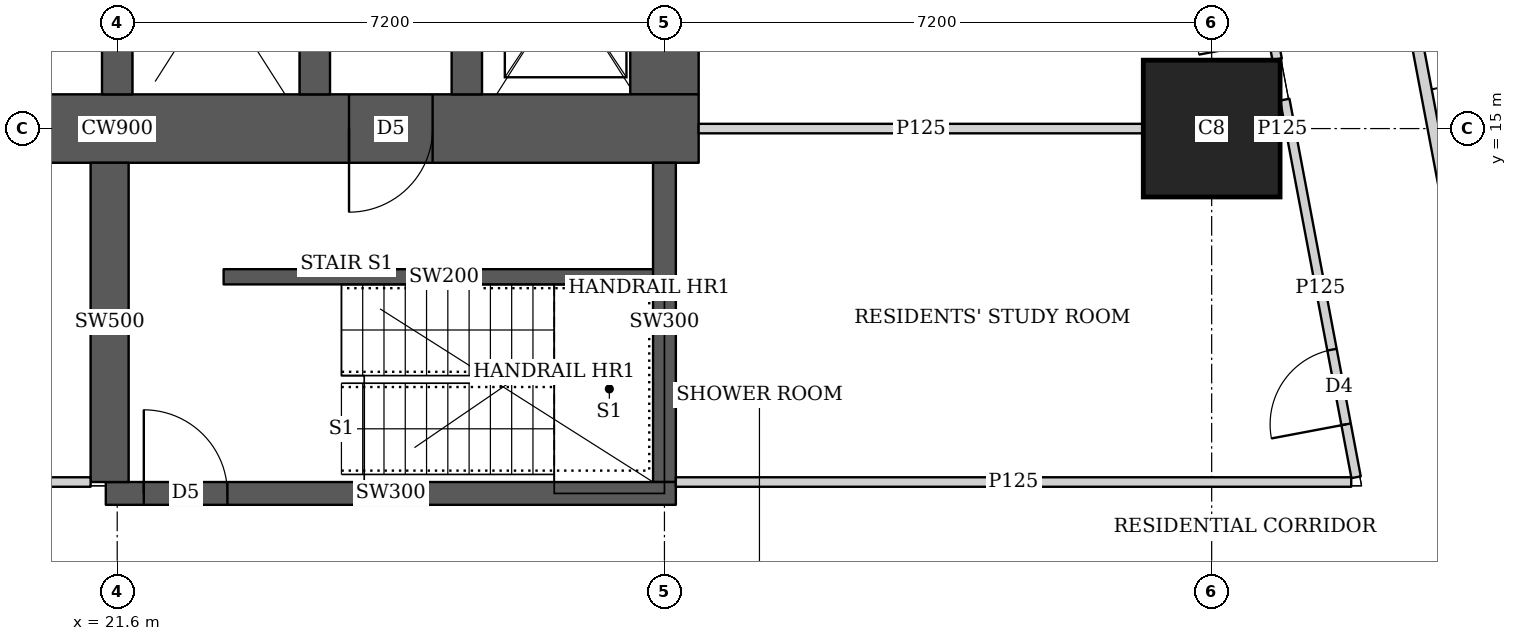
"""IFC4 building model, lengths in metres.
Left out: names, types, materials, properties, quantities, classifications, styles, units other than length and angle.
Written with IfcOpenShell. Run it as: python <this file> out.ifc"""

import sys

from ifc_helpers import new_model, si_unit, direction, frame, frame_2d, origin, origin_2d, place, context, subcontext, project, spatial, rectangle, extrude, element, fill, save


model = new_model("IFC4")
c1 = context("Model", 3, precision=1e-05, world=origin(), true_north=direction((0.0, 1.0)))
c2 = subcontext(c1, "Body", "Model", "MODEL_VIEW")
j1 = project(units=[si_unit("LENGTHUNIT", "METRE"), si_unit("PLANEANGLEUNIT", "RADIAN")], contexts=[c1])
p1 = place(None, origin())
s1 = spatial("IfcSite", under=j1, at=p1, CompositionType="ELEMENT")
p2 = place(p1, origin())
s2 = spatial("IfcBuilding", under=s1, at=p2, CompositionType="ELEMENT")
p3 = place(p2, frame((0.0, 0.0, 23.75)))
s3 = spatial("IfcBuildingStorey", under=s2, at=p3, CompositionType="ELEMENT", Elevation=23.75)
p4 = place(p3, frame((36.0, 15.0, 0.0), z_axis=(0.0, 0.0, 1.0), x_axis=(1.0, 0.0, 0.0)))
e1 = element("IfcColumn", 1, at=p4, inside=s3, PredefinedType="COLUMN", context=c2, shape_type="SweptSolid", body=[
    extrude(rectangle(XDim=1.8, YDim=1.8, at=origin_2d()), origin(), (0.0, 0.0, 1.0), 3.75),
])
p5 = place(p3, frame((13.95, 15.0, 0.0), z_axis=(0.0, 0.0, 1.0), x_axis=(1.0, 0.0, 0.0)))
e2 = element("IfcWall", 2, at=p5, inside=s3, PredefinedType="SHEAR", context=c2, shape_type="SweptSolid", body=[
    extrude(rectangle(XDim=15.3, YDim=0.9, at=frame_2d((7.65, 0.0))), origin(), (0.0, 0.0, 1.0), 3.75),
])
p6 = place(p5, frame((4.45, 0.0, 0.0)))
e3 = element("IfcOpeningElement", 3, at=p6, cuts=e2, PredefinedType="OPENING", context=c2, shape_type="SweptSolid", body=[
    extrude(rectangle(XDim=1.8, YDim=2.1, at=frame_2d((0.9, 1.05))), frame((0.0, 0.46, 0.0), z_axis=(0.0, -1.0, 0.0), x_axis=(1.0, 0.0, 0.0)), (0.0, 0.0, 1.0), 0.92),
])
p7 = place(p5, frame((10.7, 0.0, 0.0)))
e4 = element("IfcOpeningElement", 4, at=p7, cuts=e2, PredefinedType="OPENING", context=c2, shape_type="SweptSolid", body=[
    extrude(rectangle(XDim=1.1, YDim=2.1, at=frame_2d((0.55, 1.05))), frame((0.0, 0.46, 0.0), z_axis=(0.0, -1.0, 0.0), x_axis=(1.0, 0.0, 0.0)), (0.0, 0.0, 1.0), 0.92),
])
p8 = place(p3, frame((28.8, 15.45, 0.0), z_axis=(0.0, 0.0, 1.0), x_axis=(0.0, 1.0, 0.0)))
e5 = element("IfcWall", 5, at=p8, inside=s3, PredefinedType="SHEAR", context=c2, shape_type="SweptSolid", body=[
    extrude(rectangle(XDim=14.1, YDim=0.9, at=frame_2d((7.05, 0.0))), origin(), (0.0, 0.0, 1.0), 3.75),
])
for number, where, z_axis, x_axis in (
    (6, (21.6, 15.45, 0.0), (0.0, 0.0, 1.0), (0.0, 1.0, 0.0)),
    (7, (24.2, 15.45, 0.0), (0.0, 0.0, 1.0), (0.0, 1.0, 0.0)),
):
    element("IfcWall", number, at=place(p3, frame(where, z_axis=z_axis, x_axis=x_axis)), inside=s3, PredefinedType="SHEAR", context=c2, shape_type="SweptSolid", body=[
        extrude(rectangle(XDim=14.1, YDim=0.4, at=frame_2d((7.05, 0.0))), origin(), (0.0, 0.0, 1.0), 3.75),
    ])
p9 = place(p3, frame((26.2, 15.45, 0.0), z_axis=(0.0, 0.0, 1.0), x_axis=(0.0, 1.0, 0.0)))
e8 = element("IfcWall", 8, at=p9, inside=s3, PredefinedType="SHEAR", context=c2, shape_type="SweptSolid", body=[
    extrude(rectangle(XDim=3.1, YDim=0.4, at=frame_2d((1.55, 0.0))), origin(), (0.0, 0.0, 1.0), 3.75),
])
p10 = place(p9, frame((0.825, 0.0, 0.0)))
e9 = element("IfcOpeningElement", 9, at=p10, cuts=e8, PredefinedType="OPENING", context=c2, shape_type="SweptSolid", body=[
    extrude(rectangle(XDim=1.2, YDim=2.1, at=frame_2d((0.6, 1.05))), frame((0.0, 0.21, 0.0), z_axis=(0.0, -1.0, 0.0), x_axis=(1.0, 0.0, 0.0)), (0.0, 0.0, 1.0), 0.42),
])
p11 = place(p3, frame((21.45, 10.2, 0.0), z_axis=(0.0, 0.0, 1.0), x_axis=(1.0, 0.0, 0.0)))
e10 = element("IfcWall", 10, at=p11, inside=s3, PredefinedType="SHEAR", context=c2, shape_type="SweptSolid", body=[
    extrude(rectangle(XDim=7.5, YDim=0.3, at=frame_2d((3.75, 0.0))), origin(), (0.0, 0.0, 1.0), 3.75),
])
p12 = place(p11, frame((0.5, 0.0, 0.0)))
e11 = element("IfcOpeningElement", 11, at=p12, cuts=e10, PredefinedType="OPENING", context=c2, shape_type="SweptSolid", body=[
    extrude(rectangle(XDim=1.1, YDim=2.1, at=frame_2d((0.55, 1.05))), frame((0.0, 0.16, 0.0), z_axis=(0.0, -1.0, 0.0), x_axis=(1.0, 0.0, 0.0)), (0.0, 0.0, 1.0), 0.32),
])
p13 = place(p3, frame((21.5, 10.35, 0.0), z_axis=(0.0, 0.0, 1.0), x_axis=(0.0, 1.0, 0.0)))
e12 = element("IfcWall", 12, at=p13, inside=s3, PredefinedType="SHEAR", context=c2, shape_type="SweptSolid", body=[
    extrude(rectangle(XDim=4.2, YDim=0.5, at=frame_2d((2.1, 0.0))), origin(), (0.0, 0.0, 1.0), 3.75),
])
p14 = place(p3, frame((28.8, 10.35, 0.0), z_axis=(0.0, 0.0, 1.0), x_axis=(0.0, 1.0, 0.0)))
e13 = element("IfcWall", 13, at=p14, inside=s3, PredefinedType="SHEAR", context=c2, shape_type="SweptSolid", body=[
    extrude(rectangle(XDim=4.2, YDim=0.3, at=frame_2d((2.1, 0.0))), origin(), (0.0, 0.0, 1.0), 3.75),
])
p15 = place(p3, frame((33.755, 42.325, 0.0), z_axis=(0.0, 0.0, 1.0), x_axis=(0.185611461091, -0.982623216453, 0.0)))
e14 = element("IfcWall", 14, at=p15, inside=s3, PredefinedType="SOLIDWALL", context=c2, shape_type="SweptSolid", body=[
    extrude(rectangle(XDim=40.241, YDim=0.15, at=frame_2d((20.121, 0.0))), origin(), (0.0, 0.0, 1.0), 2.5),
])
p16 = place(p15, frame((7.325, 0.0, 0.0)))
e15 = element("IfcOpeningElement", 15, at=p16, cuts=e14, PredefinedType="OPENING", context=c2, shape_type="SweptSolid", body=[
    extrude(rectangle(XDim=1.0, YDim=2.1, at=frame_2d((0.5, 1.05))), frame((0.0, 0.085, 0.0), z_axis=(0.0, -1.0, 0.0), x_axis=(1.0, 0.0, 0.0)), (0.0, 0.0, 1.0), 0.17),
])
p17 = place(p15, frame((11.902, 0.0, 0.0)))
e16 = element("IfcOpeningElement", 16, at=p17, cuts=e14, PredefinedType="OPENING", context=c2, shape_type="SweptSolid", body=[
    extrude(rectangle(XDim=1.0, YDim=2.1, at=frame_2d((0.5, 1.05))), frame((0.0, 0.085, 0.0), z_axis=(0.0, -1.0, 0.0), x_axis=(1.0, 0.0, 0.0)), (0.0, 0.0, 1.0), 0.17),
])
p18 = place(p15, frame((25.718, 0.0, 0.0)))
e17 = element("IfcOpeningElement", 17, at=p18, cuts=e14, PredefinedType="OPENING", context=c2, shape_type="SweptSolid", body=[
    extrude(rectangle(XDim=1.0, YDim=2.1, at=frame_2d((0.5, 1.05))), frame((0.0, 0.085, 0.0), z_axis=(0.0, -1.0, 0.0), x_axis=(1.0, 0.0, 0.0)), (0.0, 0.0, 1.0), 0.17),
])
p19 = place(p15, frame((31.788, 0.0, 0.0)))
e18 = element("IfcOpeningElement", 18, at=p19, cuts=e14, PredefinedType="OPENING", context=c2, shape_type="SweptSolid", body=[
    extrude(rectangle(XDim=1.0, YDim=2.1, at=frame_2d((0.5, 1.05))), frame((0.0, 0.085, 0.0), z_axis=(0.0, -1.0, 0.0), x_axis=(1.0, 0.0, 0.0)), (0.0, 0.0, 1.0), 0.17),
])
p20 = place(p3, frame((10.413, 10.35, 0.0), z_axis=(0.0, 0.0, 1.0), x_axis=(1.0, 0.0, 0.0)))
e19 = element("IfcWall", 19, at=p20, inside=s3, PredefinedType="PARTITIONING", context=c2, shape_type="SweptSolid", body=[
    extrude(rectangle(XDim=10.837, YDim=0.125, at=frame_2d((5.418, 0.0))), origin(), (0.0, 0.0, 1.0), 3.5),
])
p21 = place(p20, frame((7.582, 0.0, 0.0)))
e20 = element("IfcOpeningElement", 20, at=p21, cuts=e19, PredefinedType="OPENING", context=c2, shape_type="SweptSolid", body=[
    extrude(rectangle(XDim=1.8, YDim=2.1, at=frame_2d((0.9, 1.05))), frame((0.0, 0.073, 0.0), z_axis=(0.0, -1.0, 0.0), x_axis=(1.0, 0.0, 0.0)), (0.0, 0.0, 1.0), 0.145),
])
p22 = place(p3, frame((28.95, 10.35, 0.0), z_axis=(0.0, 0.0, 1.0), x_axis=(1.0, 0.0, 0.0)))
e21 = element("IfcWall", 21, at=p22, inside=s3, PredefinedType="PARTITIONING", context=c2, shape_type="SweptSolid", body=[
    extrude(rectangle(XDim=8.886, YDim=0.125, at=frame_2d((4.443, 0.0))), origin(), (0.0, 0.0, 1.0), 3.5),
])
p23 = place(p3, frame((37.9, 10.413, 0.0), z_axis=(0.0, 0.0, 1.0), x_axis=(-0.185527510388, 0.982639070508, 0.0)))
e22 = element("IfcWall", 22, at=p23, inside=s3, PredefinedType="PARTITIONING", context=c2, shape_type="SweptSolid", body=[
    extrude(rectangle(XDim=5.056, YDim=0.125, at=frame_2d((2.528, 0.0))), origin(), (0.0, 0.0, 1.0), 3.5),
])
p24 = place(p23, frame((0.708, 0.0, 0.0)))
e23 = element("IfcOpeningElement", 23, at=p24, cuts=e22, PredefinedType="OPENING", context=c2, shape_type="SweptSolid", body=[
    extrude(rectangle(XDim=1.0, YDim=2.1, at=frame_2d((0.5, 1.05))), frame((0.0, 0.073, 0.0), z_axis=(0.0, -1.0, 0.0), x_axis=(1.0, 0.0, 0.0)), (0.0, 0.0, 1.0), 0.145),
])
p25 = place(p3, frame((36.861, 15.913, 0.0), z_axis=(0.0, 0.0, 1.0), x_axis=(-0.185598960122, 0.982625577726, 0.0)))
e24 = element("IfcWall", 24, at=p25, inside=s3, PredefinedType="PARTITIONING", context=c2, shape_type="SweptSolid", body=[
    extrude(rectangle(XDim=6.703, YDim=0.125, at=frame_2d((3.352, 0.0))), origin(), (0.0, 0.0, 1.0), 2.5),
])
p26 = place(p25, frame((0.25, 0.0, 0.0)))
e25 = element("IfcOpeningElement", 25, at=p26, cuts=e24, PredefinedType="OPENING", context=c2, shape_type="SweptSolid", body=[
    extrude(rectangle(XDim=1.0, YDim=2.1, at=frame_2d((0.5, 1.05))), frame((0.0, 0.073, 0.0), z_axis=(0.0, -1.0, 0.0), x_axis=(1.0, 0.0, 0.0)), (0.0, 0.0, 1.0), 0.145),
])
p27 = place(p25, frame((3.71, 0.0, 0.0)))
e26 = element("IfcOpeningElement", 26, at=p27, cuts=e24, PredefinedType="OPENING", context=c2, shape_type="SweptSolid", body=[
    extrude(rectangle(XDim=1.0, YDim=2.1, at=frame_2d((0.5, 1.05))), frame((0.0, 0.073, 0.0), z_axis=(0.0, -1.0, 0.0), x_axis=(1.0, 0.0, 0.0)), (0.0, 0.0, 1.0), 0.145),
])
p28 = place(p3, frame((29.25, 15.0, 0.0), z_axis=(0.0, 0.0, 1.0), x_axis=(1.0, 0.0, 0.0)))
e27 = element("IfcWall", 27, at=p28, inside=s3, PredefinedType="PARTITIONING", context=c2, shape_type="SweptSolid", body=[
    extrude(rectangle(XDim=5.849, YDim=0.125, at=frame_2d((2.925, 0.0))), origin(), (0.0, 0.0, 1.0), 3.5),
])
p29 = place(p3, frame((36.901, 15.0, 0.0), z_axis=(0.0, 0.0, 1.0), x_axis=(1.0, 0.0, 0.0)))
e28 = element("IfcWall", 28, at=p29, inside=s3, PredefinedType="PARTITIONING", context=c2, shape_type="SweptSolid", body=[
    extrude(rectangle(XDim=0.057, YDim=0.125, at=frame_2d((0.029, 0.0))), origin(), (0.0, 0.0, 1.0), 3.5),
])
p30 = place(p3, frame((23.0, 13.05, 0.0), z_axis=(0.0, 0.0, 1.0), x_axis=(1.0, 0.0, 0.0)))
e29 = element("IfcWall", 29, at=p30, inside=s3, PredefinedType="SHEAR", context=c2, shape_type="SweptSolid", body=[
    extrude(rectangle(XDim=5.8, YDim=0.2, at=frame_2d((2.9, 0.0))), origin(), (0.0, 0.0, 1.0), 3.75),
])
p31 = place(p24, origin())
e30 = element("IfcDoor", 30, at=p31, inside=s3, OperationType="SINGLE_SWING_LEFT", PredefinedType="DOOR", context=c2, shape_type="SweptSolid", body=[
    extrude(rectangle(XDim=1.0, YDim=2.1, at=frame_2d((0.5, 1.05))), frame((0.0, 0.025, 0.0), z_axis=(0.0, -1.0, 0.0), x_axis=(1.0, 0.0, 0.0)), (0.0, 0.0, 1.0), 0.05),
])
fill(e23, e30)
p32 = place(p7, origin())
e31 = element("IfcDoor", 31, at=p32, inside=s3, OperationType="SINGLE_SWING_RIGHT", PredefinedType="DOOR", context=c2, shape_type="SweptSolid", body=[
    extrude(rectangle(XDim=1.1, YDim=2.1, at=frame_2d((0.55, 1.05))), frame((0.0, 0.025, 0.0), z_axis=(0.0, -1.0, 0.0), x_axis=(1.0, 0.0, 0.0)), (0.0, 0.0, 1.0), 0.05),
])
fill(e4, e31)
p33 = place(p12, origin())
e32 = element("IfcDoor", 32, at=p33, inside=s3, OperationType="SINGLE_SWING_LEFT", PredefinedType="DOOR", context=c2, shape_type="SweptSolid", body=[
    extrude(rectangle(XDim=1.1, YDim=2.1, at=frame_2d((0.55, 1.05))), frame((0.0, 0.025, 0.0), z_axis=(0.0, -1.0, 0.0), x_axis=(1.0, 0.0, 0.0)), (0.0, 0.0, 1.0), 0.05),
])
fill(e11, e32)
save(model, sys.argv[1])
